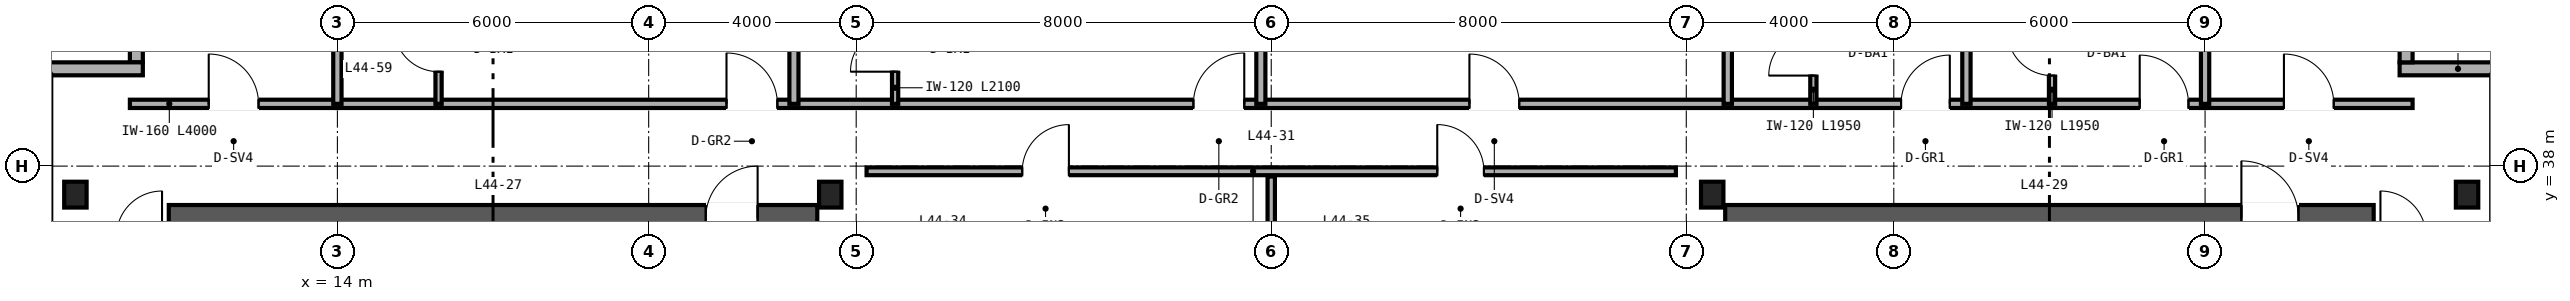
"""IFC4 building model, lengths in metres.
Left out: names, types, materials, properties, quantities, classifications, styles, units other than length and angle.
Written with IfcOpenShell. Run it as: python <this file> out.ifc"""

import sys

from ifc_helpers import new_model, si_unit, direction, frame, frame_2d, origin, origin_2d, place, context, subcontext, project, spatial, rectangle, i_section, extrude, source, transform, mapped, element, fill, save


model = new_model("IFC4")
c1 = context("Model", 3, precision=1e-05, world=origin(), true_north=direction((0.0, 1.0)))
c2 = subcontext(c1, "Body", "Model", "MODEL_VIEW")
j1 = project(units=[si_unit("LENGTHUNIT", "METRE"), si_unit("PLANEANGLEUNIT", "RADIAN")], contexts=[c1])
p1 = place(None, origin())
s1 = spatial("IfcSite", under=j1, at=p1, CompositionType="ELEMENT")
p2 = place(p1, origin())
s2 = spatial("IfcBuilding", under=s1, at=p2, CompositionType="ELEMENT")
p3 = place(p2, frame((0.0, 0.0, 177.6)))
s3 = spatial("IfcBuildingStorey", under=s2, at=p3, CompositionType="ELEMENT", Elevation=177.6)
p4 = place(p3, frame((10.75, 37.0, 0.0), z_axis=(0.0, 0.0, 1.0), x_axis=(1.0, 0.0, 0.0)))
e1 = element("IfcWall", 1, at=p4, inside=s3, PredefinedType="SHEAR", context=c2, shape_type="SweptSolid", body=[
    extrude(rectangle(XDim=12.5, YDim=0.5, at=frame_2d((6.25, 0.0))), origin(), (0.0, 0.0, 1.0), 3.37),
])
p5 = place(p4, frame((10.35, 0.0, 0.0)))
e2 = element("IfcOpeningElement", 2, at=p5, cuts=e1, PredefinedType="OPENING", context=c2, shape_type="SweptSolid", body=[
    extrude(rectangle(XDim=1.0, YDim=2.15, at=frame_2d((0.5, 1.075))), frame((0.0, 0.26, 0.0), z_axis=(0.0, -1.0, 0.0), x_axis=(1.0, 0.0, 0.0)), (0.0, 0.0, 1.0), 0.52),
])
p6 = place(p3, frame((40.75, 37.0, 0.0), z_axis=(0.0, 0.0, 1.0), x_axis=(1.0, 0.0, 0.0)))
e3 = element("IfcWall", 3, at=p6, inside=s3, PredefinedType="SHEAR", context=c2, shape_type="SweptSolid", body=[
    extrude(rectangle(XDim=12.5, YDim=0.5, at=frame_2d((6.25, 0.0))), origin(), (0.0, 0.0, 1.0), 3.37),
])
p7 = place(p6, frame((9.95, 0.0, 0.0)))
e4 = element("IfcOpeningElement", 4, at=p7, cuts=e3, PredefinedType="OPENING", context=c2, shape_type="SweptSolid", body=[
    extrude(rectangle(XDim=1.1, YDim=2.15, at=frame_2d((0.55, 1.075))), frame((0.0, 0.26, 0.0), z_axis=(0.0, -1.0, 0.0), x_axis=(1.0, 0.0, 0.0)), (0.0, 0.0, 1.0), 0.52),
])
m1 = source(origin(), c2, "Body", "SweptSolid", [
    extrude(i_section(OverallWidth=0.432, OverallDepth=0.498, WebThickness=0.056, FlangeThickness=0.089, FilletRadius=0.025, at=origin_2d()), origin(), (0.0, 0.0, 1.0), 3.37),
])
for number, where, z_axis, x_axis in (
    (5, (8.95, 37.45, 0.0), (0.0, 0.0, 1.0), (1.0, 0.0, 0.0)),
    (6, (23.5, 37.45, 0.0), (0.0, 0.0, 1.0), (1.0, 0.0, 0.0)),
    (7, (40.5, 37.45, 0.0), (0.0, 0.0, 1.0), (1.0, 0.0, 0.0)),
    (8, (55.05, 37.45, 0.0), (0.0, 0.0, 1.0), (1.0, 0.0, 0.0)),
):
    element("IfcColumn", number, at=place(p3, frame(where, z_axis=z_axis, x_axis=x_axis)), inside=s3, PredefinedType="COLUMN", context=c2, shape_type="MappedRepresentation", body=[
        mapped(m1, transform((0.0, 0.0, 0.0), scale=1.0)),
    ])
p8 = place(p3, frame((56.0, 39.875, 0.0), z_axis=(0.0, 0.0, 1.0), x_axis=(-1.0, 0.0, 0.0)))
e9 = element("IfcWall", 9, at=p8, inside=s3, PredefinedType="SOLIDWALL", context=c2, shape_type="SweptSolid", body=[
    extrude(rectangle(XDim=2.25, YDim=0.25, at=frame_2d((1.125, 0.0))), origin(), (0.0, 0.0, 1.0), 3.37),
])
for number, where, z_axis, x_axis in (
    (10, (53.875, 40.0, 0.0), (0.0, 0.0, 1.0), (0.0, 1.0, 0.0)),
    (11, (10.125, 42.0, 0.0), (0.0, 0.0, 1.0), (0.0, -1.0, 0.0)),
):
    element("IfcWall", number, at=place(p3, frame(where, z_axis=z_axis, x_axis=x_axis)), inside=s3, PredefinedType="SOLIDWALL", context=c2, shape_type="SweptSolid", body=[
        extrude(rectangle(XDim=2.0, YDim=0.25, at=frame_2d((1.0, 0.0))), origin(), (0.0, 0.0, 1.0), 3.37),
    ])
p9 = place(p3, frame((10.25, 39.875, 0.0), z_axis=(0.0, 0.0, 1.0), x_axis=(-1.0, 0.0, 0.0)))
e12 = element("IfcWall", 12, at=p9, inside=s3, PredefinedType="SOLIDWALL", context=c2, shape_type="SweptSolid", body=[
    extrude(rectangle(XDim=2.25, YDim=0.25, at=frame_2d((1.125, 0.0))), origin(), (0.0, 0.0, 1.0), 3.37),
])
p10 = place(p3, frame((24.2, 37.9, 0.0), z_axis=(0.0, 0.0, 1.0), x_axis=(1.0, 0.0, 0.0)))
e13 = element("IfcWall", 13, at=p10, inside=s3, PredefinedType="PARTITIONING", context=c2, shape_type="SweptSolid", body=[
    extrude(rectangle(XDim=15.6, YDim=0.15, at=frame_2d((7.8, 0.0))), origin(), (0.0, 0.0, 1.0), 3.37),
])
p11 = place(p10, frame((3.0, 0.0, 0.0)))
e14 = element("IfcOpeningElement", 14, at=p11, cuts=e13, PredefinedType="OPENING", context=c2, shape_type="SweptSolid", body=[
    extrude(rectangle(XDim=0.9, YDim=2.15, at=frame_2d((0.45, 1.075))), frame((0.0, 0.085, 0.0), z_axis=(0.0, -1.0, 0.0), x_axis=(1.0, 0.0, 0.0)), (0.0, 0.0, 1.0), 0.17),
])
p12 = place(p10, frame((11.0, 0.0, 0.0)))
e15 = element("IfcOpeningElement", 15, at=p12, cuts=e13, PredefinedType="OPENING", context=c2, shape_type="SweptSolid", body=[
    extrude(rectangle(XDim=0.9, YDim=2.15, at=frame_2d((0.45, 1.075))), frame((0.0, 0.085, 0.0), z_axis=(0.0, -1.0, 0.0), x_axis=(1.0, 0.0, 0.0)), (0.0, 0.0, 1.0), 0.17),
])
p13 = place(p3, frame((32.0, 36.12, 0.0), z_axis=(0.0, 0.0, 1.0), x_axis=(0.0, 1.0, 0.0)))
e16 = element("IfcWall", 16, at=p13, inside=s3, PredefinedType="PARTITIONING", context=c2, shape_type="SweptSolid", body=[
    extrude(rectangle(XDim=1.68, YDim=0.142, at=frame_2d((0.84, 0.0))), origin(), (0.0, 0.0, 1.0), 3.37),
])
p14 = place(p3, frame((10.0, 39.2, 0.0), z_axis=(0.0, 0.0, 1.0), x_axis=(1.0, 0.0, 0.0)))
e17 = element("IfcWall", 17, at=p14, inside=s3, PredefinedType="PARTITIONING", context=c2, shape_type="SweptSolid", body=[
    extrude(rectangle(XDim=4.0, YDim=0.16, at=frame_2d((2.0, 0.0))), origin(), (0.0, 0.0, 1.0), 3.37),
])
p15 = place(p14, frame((1.52, 0.0, 0.0)))
e18 = element("IfcOpeningElement", 18, at=p15, cuts=e17, PredefinedType="OPENING", context=c2, shape_type="SweptSolid", body=[
    extrude(rectangle(XDim=0.96, YDim=2.15, at=frame_2d((0.48, 1.075))), frame((0.0, 0.09, 0.0), z_axis=(0.0, -1.0, 0.0), x_axis=(1.0, 0.0, 0.0)), (0.0, 0.0, 1.0), 0.18),
])
p16 = place(p3, frame((50.0, 39.2, 0.0), z_axis=(0.0, 0.0, 1.0), x_axis=(1.0, 0.0, 0.0)))
e19 = element("IfcWall", 19, at=p16, inside=s3, PredefinedType="PARTITIONING", context=c2, shape_type="SweptSolid", body=[
    extrude(rectangle(XDim=4.0, YDim=0.16, at=frame_2d((2.0, 0.0))), origin(), (0.0, 0.0, 1.0), 3.37),
])
p17 = place(p16, frame((1.52, 0.0, 0.0)))
e20 = element("IfcOpeningElement", 20, at=p17, cuts=e19, PredefinedType="OPENING", context=c2, shape_type="SweptSolid", body=[
    extrude(rectangle(XDim=0.96, YDim=2.15, at=frame_2d((0.48, 1.075))), frame((0.0, 0.09, 0.0), z_axis=(0.0, -1.0, 0.0), x_axis=(1.0, 0.0, 0.0)), (0.0, 0.0, 1.0), 0.18),
])
p18 = place(p3, frame((14.0, 39.2, 0.0), z_axis=(0.0, 0.0, 1.0), x_axis=(1.0, 0.0, 0.0)))
e21 = element("IfcWall", 21, at=p18, inside=s3, PredefinedType="PARTITIONING", context=c2, shape_type="SweptSolid", body=[
    extrude(rectangle(XDim=36.0, YDim=0.16, at=frame_2d((18.0, 0.0))), origin(), (0.0, 0.0, 1.0), 2.913),
])
p19 = place(p18, frame((7.5, 0.0, 0.0)))
e22 = element("IfcOpeningElement", 22, at=p19, cuts=e21, PredefinedType="OPENING", context=c2, shape_type="SweptSolid", body=[
    extrude(rectangle(XDim=0.98, YDim=2.2, at=frame_2d((0.49, 1.1))), frame((0.0, 0.09, 0.0), z_axis=(0.0, -1.0, 0.0), x_axis=(1.0, 0.0, 0.0)), (0.0, 0.0, 1.0), 0.18),
])
p20 = place(p18, frame((16.5, 0.0, 0.0)))
e23 = element("IfcOpeningElement", 23, at=p20, cuts=e21, PredefinedType="OPENING", context=c2, shape_type="SweptSolid", body=[
    extrude(rectangle(XDim=0.98, YDim=2.2, at=frame_2d((0.49, 1.1))), frame((0.0, 0.09, 0.0), z_axis=(0.0, -1.0, 0.0), x_axis=(1.0, 0.0, 0.0)), (0.0, 0.0, 1.0), 0.18),
])
p21 = place(p18, frame((21.82, 0.0, 0.0)))
e24 = element("IfcOpeningElement", 24, at=p21, cuts=e21, PredefinedType="OPENING", context=c2, shape_type="SweptSolid", body=[
    extrude(rectangle(XDim=0.96, YDim=2.15, at=frame_2d((0.48, 1.075))), frame((0.0, 0.09, 0.0), z_axis=(0.0, -1.0, 0.0), x_axis=(1.0, 0.0, 0.0)), (0.0, 0.0, 1.0), 0.18),
])
p22 = place(p18, frame((30.14, 0.0, 0.0)))
e25 = element("IfcOpeningElement", 25, at=p22, cuts=e21, PredefinedType="OPENING", context=c2, shape_type="SweptSolid", body=[
    extrude(rectangle(XDim=0.94, YDim=2.15, at=frame_2d((0.47, 1.075))), frame((0.0, 0.09, 0.0), z_axis=(0.0, -1.0, 0.0), x_axis=(1.0, 0.0, 0.0)), (0.0, 0.0, 1.0), 0.18),
])
p23 = place(p18, frame((34.74, 0.0, 0.0)))
e26 = element("IfcOpeningElement", 26, at=p23, cuts=e21, PredefinedType="OPENING", context=c2, shape_type="SweptSolid", body=[
    extrude(rectangle(XDim=0.94, YDim=2.15, at=frame_2d((0.47, 1.075))), frame((0.0, 0.09, 0.0), z_axis=(0.0, -1.0, 0.0), x_axis=(1.0, 0.0, 0.0)), (0.0, 0.0, 1.0), 0.18),
])
for number, where, z_axis, x_axis in (
    (27, (14.0, 39.2, 0.0), (0.0, 0.0, 1.0), (0.0, 1.0, 0.0)),
    (28, (50.0, 39.2, 0.0), (0.0, 0.0, 1.0), (0.0, 1.0, 0.0)),
):
    element("IfcWall", number, at=place(p3, frame(where, z_axis=z_axis, x_axis=x_axis)), inside=s3, PredefinedType="PARTITIONING", context=c2, shape_type="SweptSolid", body=[
        extrude(rectangle(XDim=6.44, YDim=0.16, at=frame_2d((3.22, 0.0))), origin(), (0.0, 0.0, 1.0), 2.677),
    ])
p24 = place(p3, frame((22.8, 39.2, 0.0), z_axis=(0.0, 0.0, 1.0), x_axis=(0.0, 1.0, 0.0)))
e29 = element("IfcWall", 29, at=p24, inside=s3, PredefinedType="PARTITIONING", context=c2, shape_type="SweptSolid", body=[
    extrude(rectangle(XDim=6.44, YDim=0.175, at=frame_2d((3.22, 0.0))), origin(), (0.0, 0.0, 1.0), 2.833),
])
p25 = place(p3, frame((15.95, 39.2, 0.0), z_axis=(0.0, 0.0, 1.0), x_axis=(0.0, 1.0, 0.0)))
e30 = element("IfcWall", 30, at=p25, inside=s3, PredefinedType="PARTITIONING", context=c2, shape_type="SweptSolid", body=[
    extrude(rectangle(XDim=2.1, YDim=0.12, at=frame_2d((1.05, 0.0))), origin(), (0.0, 0.0, 1.0), 3.37),
])
p26 = place(p25, frame((0.62, 0.0, 0.0)))
e31 = element("IfcOpeningElement", 31, at=p26, cuts=e30, PredefinedType="OPENING", context=c2, shape_type="SweptSolid", body=[
    extrude(rectangle(XDim=0.86, YDim=2.1, at=frame_2d((0.43, 1.05))), frame((0.0, 0.07, 0.0), z_axis=(0.0, -1.0, 0.0), x_axis=(1.0, 0.0, 0.0)), (0.0, 0.0, 1.0), 0.14),
])
p27 = place(p3, frame((31.8, 39.2, 0.0), z_axis=(0.0, 0.0, 1.0), x_axis=(0.0, 1.0, 0.0)))
e32 = element("IfcWall", 32, at=p27, inside=s3, PredefinedType="PARTITIONING", context=c2, shape_type="SweptSolid", body=[
    extrude(rectangle(XDim=6.44, YDim=0.175, at=frame_2d((3.22, 0.0))), origin(), (0.0, 0.0, 1.0), 2.443),
])
p28 = place(p3, frame((24.75, 39.2, 0.0), z_axis=(0.0, 0.0, 1.0), x_axis=(0.0, 1.0, 0.0)))
e33 = element("IfcWall", 33, at=p28, inside=s3, PredefinedType="PARTITIONING", context=c2, shape_type="SweptSolid", body=[
    extrude(rectangle(XDim=2.1, YDim=0.12, at=frame_2d((1.05, 0.0))), origin(), (0.0, 0.0, 1.0), 3.37),
])
p29 = place(p28, frame((0.62, 0.0, 0.0)))
e34 = element("IfcOpeningElement", 34, at=p29, cuts=e33, PredefinedType="OPENING", context=c2, shape_type="SweptSolid", body=[
    extrude(rectangle(XDim=0.86, YDim=2.1, at=frame_2d((0.43, 1.05))), frame((0.0, 0.07, 0.0), z_axis=(0.0, -1.0, 0.0), x_axis=(1.0, 0.0, 0.0)), (0.0, 0.0, 1.0), 0.14),
])
p30 = place(p3, frame((40.8, 39.2, 0.0), z_axis=(0.0, 0.0, 1.0), x_axis=(0.0, 1.0, 0.0)))
e35 = element("IfcWall", 35, at=p30, inside=s3, PredefinedType="PARTITIONING", context=c2, shape_type="SweptSolid", body=[
    extrude(rectangle(XDim=6.44, YDim=0.16, at=frame_2d((3.22, 0.0))), origin(), (0.0, 0.0, 1.0), 2.443),
])
p31 = place(p3, frame((45.4, 39.2, 0.0), z_axis=(0.0, 0.0, 1.0), x_axis=(0.0, 1.0, 0.0)))
e36 = element("IfcWall", 36, at=p31, inside=s3, PredefinedType="PARTITIONING", context=c2, shape_type="SweptSolid", body=[
    extrude(rectangle(XDim=6.44, YDim=0.16, at=frame_2d((3.22, 0.0))), origin(), (0.0, 0.0, 1.0), 2.677),
])
p32 = place(p3, frame((42.45, 39.2, 0.0), z_axis=(0.0, 0.0, 1.0), x_axis=(0.0, 1.0, 0.0)))
e37 = element("IfcWall", 37, at=p32, inside=s3, PredefinedType="PARTITIONING", context=c2, shape_type="SweptSolid", body=[
    extrude(rectangle(XDim=1.95, YDim=0.12, at=frame_2d((0.975, 0.0))), origin(), (0.0, 0.0, 1.0), 3.37),
])
p33 = place(p32, frame((0.545, 0.0, 0.0)))
e38 = element("IfcOpeningElement", 38, at=p33, cuts=e37, PredefinedType="OPENING", context=c2, shape_type="SweptSolid", body=[
    extrude(rectangle(XDim=0.86, YDim=2.1, at=frame_2d((0.43, 1.05))), frame((0.0, 0.07, 0.0), z_axis=(0.0, -1.0, 0.0), x_axis=(1.0, 0.0, 0.0)), (0.0, 0.0, 1.0), 0.14),
])
p34 = place(p3, frame((47.05, 39.2, 0.0), z_axis=(0.0, 0.0, 1.0), x_axis=(0.0, 1.0, 0.0)))
e39 = element("IfcWall", 39, at=p34, inside=s3, PredefinedType="PARTITIONING", context=c2, shape_type="SweptSolid", body=[
    extrude(rectangle(XDim=1.95, YDim=0.12, at=frame_2d((0.975, 0.0))), origin(), (0.0, 0.0, 1.0), 3.37),
])
p35 = place(p34, frame((0.545, 0.0, 0.0)))
e40 = element("IfcOpeningElement", 40, at=p35, cuts=e39, PredefinedType="OPENING", context=c2, shape_type="SweptSolid", body=[
    extrude(rectangle(XDim=0.86, YDim=2.1, at=frame_2d((0.43, 1.05))), frame((0.0, 0.07, 0.0), z_axis=(0.0, -1.0, 0.0), x_axis=(1.0, 0.0, 0.0)), (0.0, 0.0, 1.0), 0.14),
])
m2 = source(origin(), c2, "Body", "SweptSolid", [
    extrude(rectangle(XDim=1.0, YDim=2.15, at=frame_2d((0.5, 1.075))), frame((0.0, 0.025, 0.0), z_axis=(0.0, -1.0, 0.0), x_axis=(1.0, 0.0, 0.0)), (0.0, 0.0, 1.0), 0.05),
])
p36 = place(p5, origin())
e41 = element("IfcDoor", 41, at=p36, inside=s3, OperationType="SINGLE_SWING_RIGHT", PredefinedType="DOOR", context=c2, shape_type="MappedRepresentation", body=[
    mapped(m2, transform((0.0, 0.0, 0.0), scale=1.0)),
])
fill(e2, e41)
m3 = source(origin(), c2, "Body", "SweptSolid", [
    extrude(rectangle(XDim=1.1, YDim=2.15, at=frame_2d((0.55, 1.075))), frame((0.0, 0.025, 0.0), z_axis=(0.0, -1.0, 0.0), x_axis=(1.0, 0.0, 0.0)), (0.0, 0.0, 1.0), 0.05),
])
p37 = place(p7, origin())
e42 = element("IfcDoor", 42, at=p37, inside=s3, OperationType="SINGLE_SWING_LEFT", PredefinedType="DOOR", context=c2, shape_type="MappedRepresentation", body=[
    mapped(m3, transform((0.0, 0.0, 0.0), scale=1.0)),
])
fill(e4, e42)
m4 = source(origin(), c2, "Body", "SweptSolid", [
    extrude(rectangle(XDim=0.9, YDim=2.15, at=frame_2d((0.45, 1.075))), frame((0.0, 0.025, 0.0), z_axis=(0.0, -1.0, 0.0), x_axis=(1.0, 0.0, 0.0)), (0.0, 0.0, 1.0), 0.05),
])
p38 = place(p11, origin())
e43 = element("IfcDoor", 43, at=p38, inside=s3, OperationType="SINGLE_SWING_RIGHT", PredefinedType="DOOR", context=c2, shape_type="MappedRepresentation", body=[
    mapped(m4, transform((0.0, 0.0, 0.0), scale=1.0)),
])
fill(e14, e43)
p39 = place(p12, origin())
e44 = element("IfcDoor", 44, at=p39, inside=s3, OperationType="SINGLE_SWING_LEFT", PredefinedType="DOOR", context=c2, shape_type="MappedRepresentation", body=[
    mapped(m4, transform((0.0, 0.0, 0.0), scale=1.0)),
])
fill(e15, e44)
m5 = source(origin(), c2, "Body", "SweptSolid", [
    extrude(rectangle(XDim=0.96, YDim=2.15, at=frame_2d((0.48, 1.075))), frame((0.0, 0.025, 0.0), z_axis=(0.0, -1.0, 0.0), x_axis=(1.0, 0.0, 0.0)), (0.0, 0.0, 1.0), 0.05),
])
p40 = place(p15, origin())
e45 = element("IfcDoor", 45, at=p40, inside=s3, OperationType="SINGLE_SWING_LEFT", PredefinedType="DOOR", context=c2, shape_type="MappedRepresentation", body=[
    mapped(m5, transform((0.0, 0.0, 0.0), scale=1.0)),
])
fill(e18, e45)
p41 = place(p17, origin())
e46 = element("IfcDoor", 46, at=p41, inside=s3, OperationType="SINGLE_SWING_LEFT", PredefinedType="DOOR", context=c2, shape_type="MappedRepresentation", body=[
    mapped(m5, transform((0.0, 0.0, 0.0), scale=1.0)),
])
fill(e20, e46)
m6 = source(origin(), c2, "Body", "SweptSolid", [
    extrude(rectangle(XDim=0.86, YDim=2.1, at=frame_2d((0.43, 1.05))), frame((0.0, 0.025, 0.0), z_axis=(0.0, -1.0, 0.0), x_axis=(1.0, 0.0, 0.0)), (0.0, 0.0, 1.0), 0.05),
])
p42 = place(p26, origin())
e47 = element("IfcDoor", 47, at=p42, inside=s3, OperationType="SINGLE_SWING_RIGHT", PredefinedType="DOOR", context=c2, shape_type="MappedRepresentation", body=[
    mapped(m6, transform((0.0, 0.0, 0.0), scale=1.0)),
])
fill(e31, e47)
p43 = place(p29, origin())
e48 = element("IfcDoor", 48, at=p43, inside=s3, OperationType="SINGLE_SWING_LEFT", PredefinedType="DOOR", context=c2, shape_type="MappedRepresentation", body=[
    mapped(m6, transform((0.0, 0.0, 0.0), scale=1.0)),
])
fill(e34, e48)
p44 = place(p33, origin())
e49 = element("IfcDoor", 49, at=p44, inside=s3, OperationType="SINGLE_SWING_LEFT", PredefinedType="DOOR", context=c2, shape_type="MappedRepresentation", body=[
    mapped(m6, transform((0.0, 0.0, 0.0), scale=1.0)),
])
fill(e38, e49)
p45 = place(p35, origin())
e50 = element("IfcDoor", 50, at=p45, inside=s3, OperationType="SINGLE_SWING_RIGHT", PredefinedType="DOOR", context=c2, shape_type="MappedRepresentation", body=[
    mapped(m6, transform((0.0, 0.0, 0.0), scale=1.0)),
])
fill(e40, e50)
m7 = source(origin(), c2, "Body", "SweptSolid", [
    extrude(rectangle(XDim=0.98, YDim=2.2, at=frame_2d((0.49, 1.1))), frame((0.0, 0.025, 0.0), z_axis=(0.0, -1.0, 0.0), x_axis=(1.0, 0.0, 0.0)), (0.0, 0.0, 1.0), 0.05),
])
p46 = place(p19, origin())
e51 = element("IfcDoor", 51, at=p46, inside=s3, OperationType="SINGLE_SWING_LEFT", PredefinedType="DOOR", context=c2, shape_type="MappedRepresentation", body=[
    mapped(m7, transform((0.0, 0.0, 0.0), scale=1.0)),
])
fill(e22, e51)
p47 = place(p20, origin())
e52 = element("IfcDoor", 52, at=p47, inside=s3, OperationType="SINGLE_SWING_RIGHT", PredefinedType="DOOR", context=c2, shape_type="MappedRepresentation", body=[
    mapped(m7, transform((0.0, 0.0, 0.0), scale=1.0)),
])
fill(e23, e52)
p48 = place(p21, origin())
e53 = element("IfcDoor", 53, at=p48, inside=s3, OperationType="SINGLE_SWING_LEFT", PredefinedType="DOOR", context=c2, shape_type="MappedRepresentation", body=[
    mapped(m5, transform((0.0, 0.0, 0.0), scale=1.0)),
])
fill(e24, e53)
m8 = source(origin(), c2, "Body", "SweptSolid", [
    extrude(rectangle(XDim=0.94, YDim=2.15, at=frame_2d((0.47, 1.075))), frame((0.0, 0.025, 0.0), z_axis=(0.0, -1.0, 0.0), x_axis=(1.0, 0.0, 0.0)), (0.0, 0.0, 1.0), 0.05),
])
p49 = place(p22, origin())
e54 = element("IfcDoor", 54, at=p49, inside=s3, OperationType="SINGLE_SWING_RIGHT", PredefinedType="DOOR", context=c2, shape_type="MappedRepresentation", body=[
    mapped(m8, transform((0.0, 0.0, 0.0), scale=1.0)),
])
fill(e25, e54)
p50 = place(p23, origin())
e55 = element("IfcDoor", 55, at=p50, inside=s3, OperationType="SINGLE_SWING_LEFT", PredefinedType="DOOR", context=c2, shape_type="MappedRepresentation", body=[
    mapped(m8, transform((0.0, 0.0, 0.0), scale=1.0)),
])
fill(e26, e55)
save(model, sys.argv[1])
